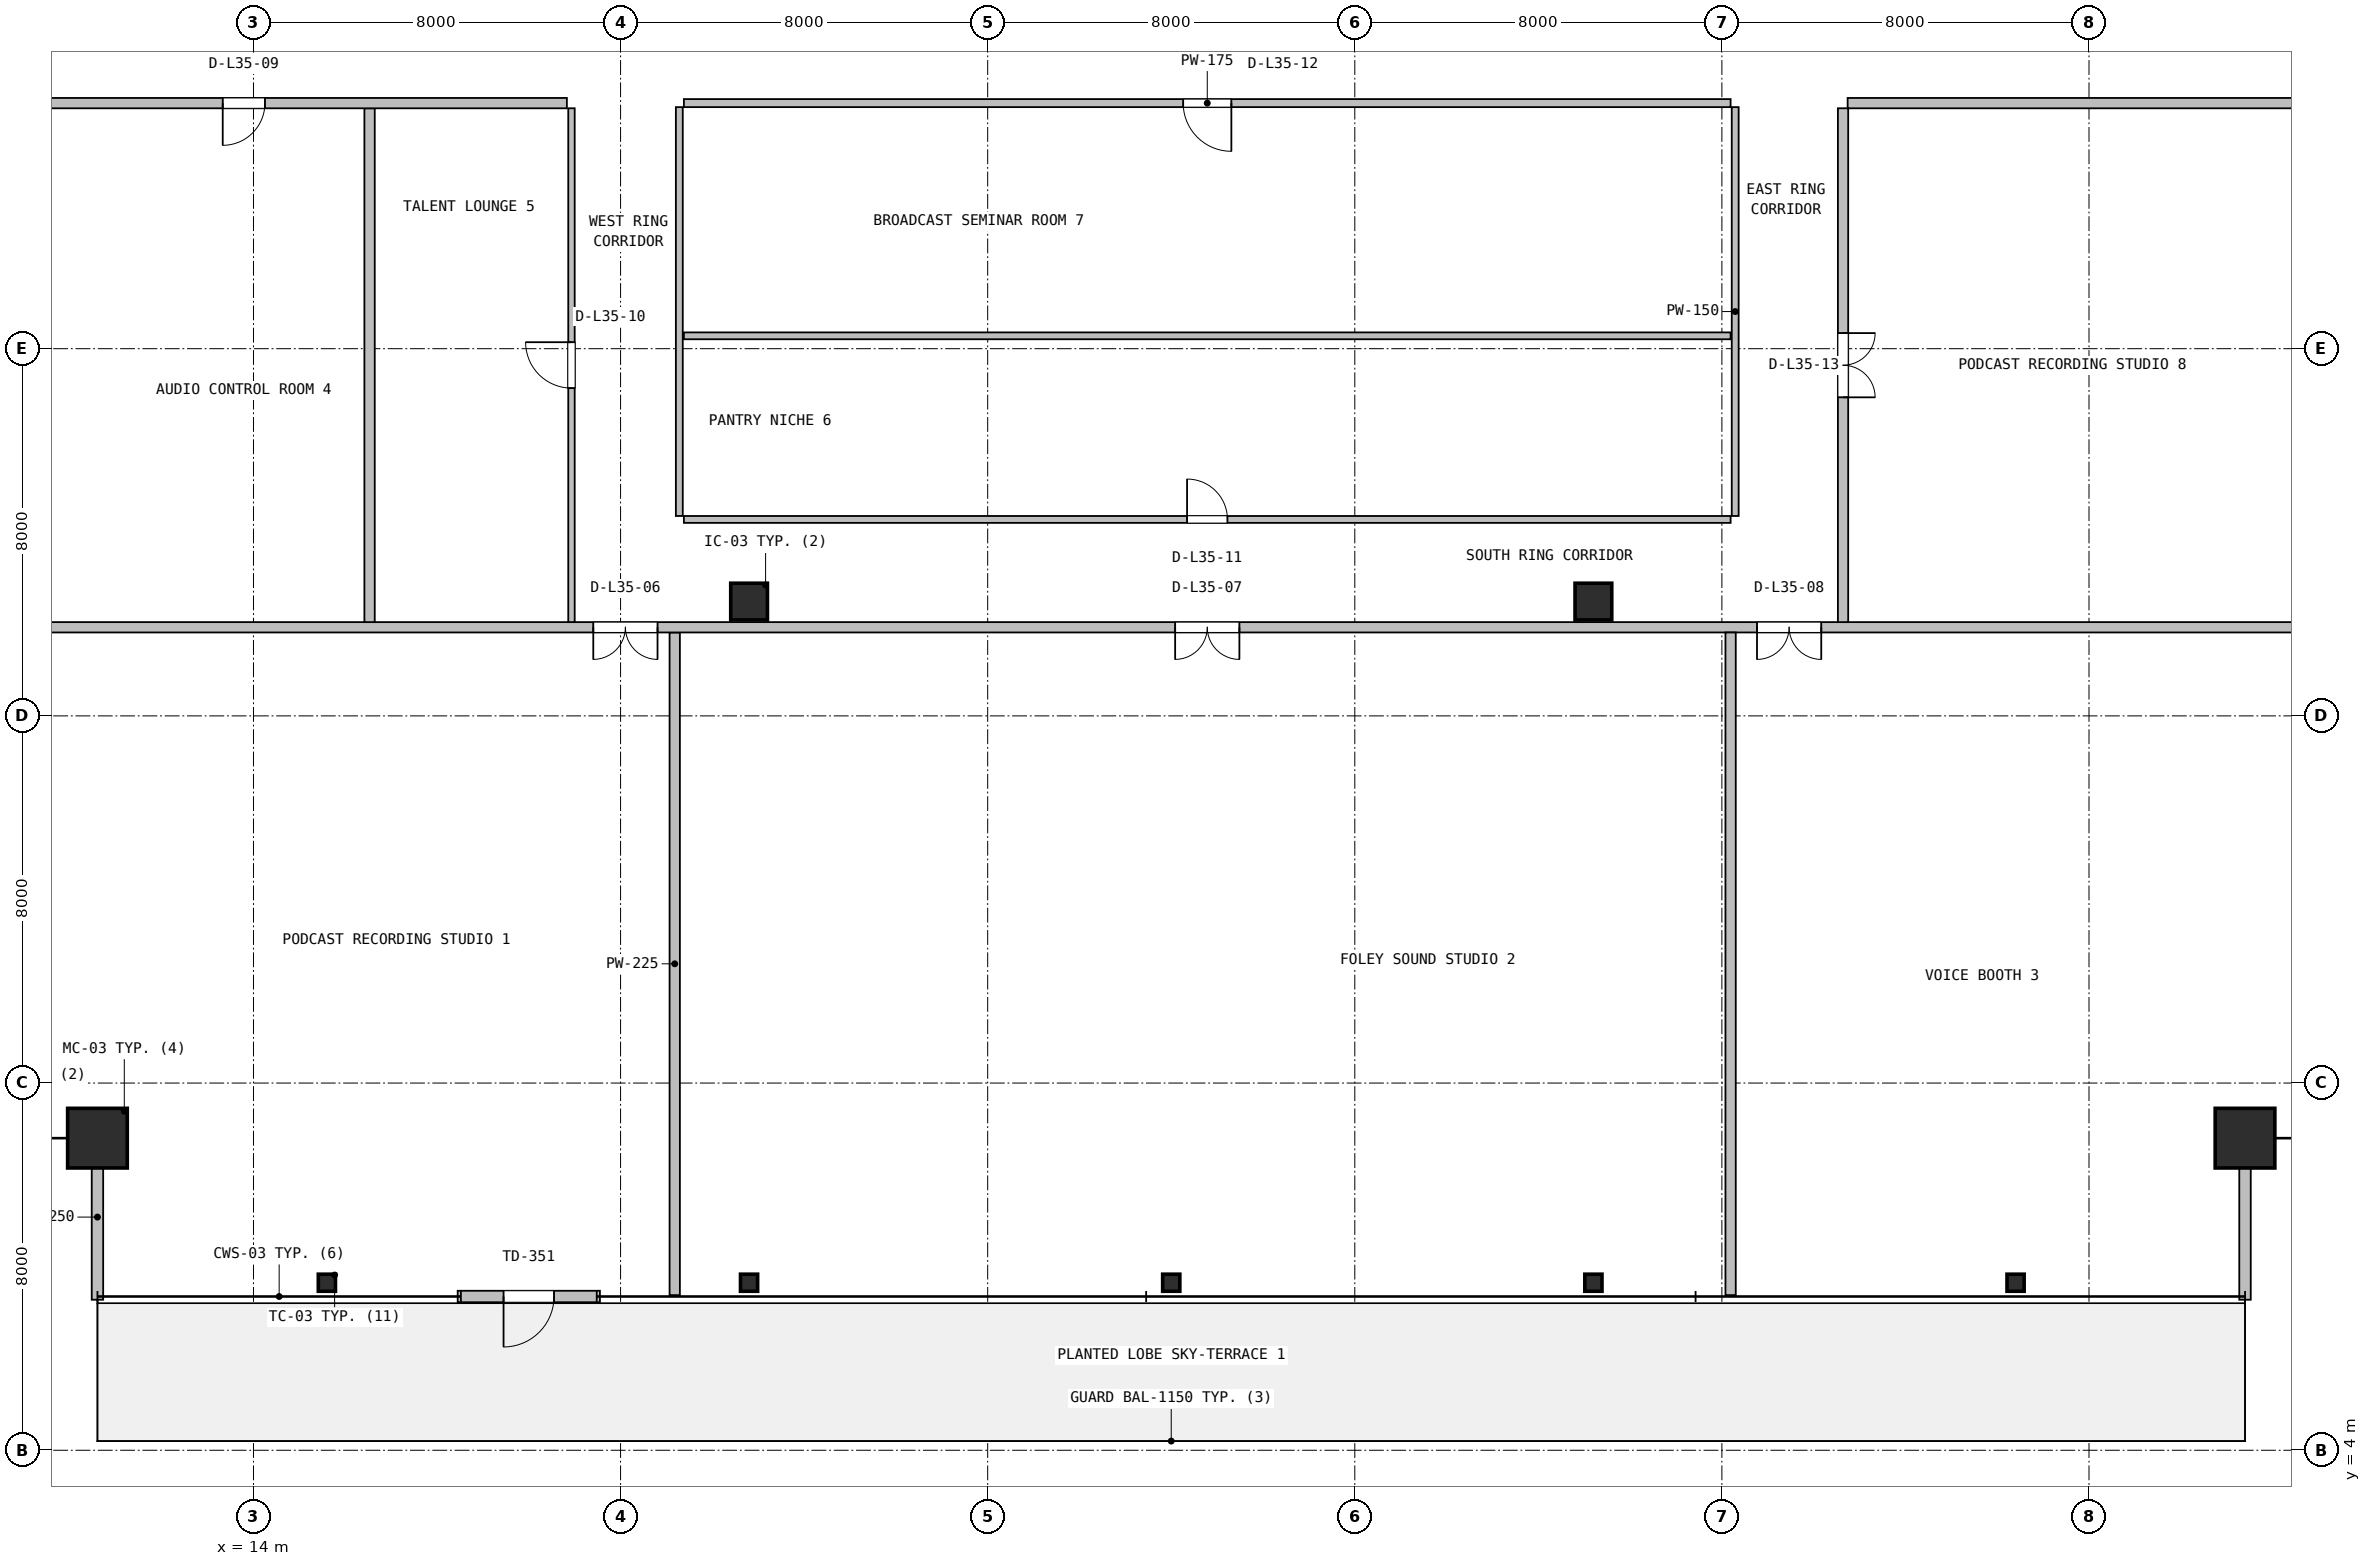
"""IFC4 building model, lengths in metres.
Left out: names, types, materials, properties, quantities, classifications, styles, units other than length and angle.
Written with IfcOpenShell. Run it as: python <this file> out.ifc"""

import sys

from ifc_helpers import new_model, si_unit, direction, frame, frame_2d, origin, origin_2d, place, context, subcontext, project, spatial, rectangle, hollow_rectangle, i_section, extrude, source, transform, mapped, element, fill, save


model = new_model("IFC4")
c1 = context("Model", 3, precision=1e-05, world=origin(), true_north=direction((0.0, 1.0)))
c2 = subcontext(c1, "Body", "Model", "MODEL_VIEW")
j1 = project(units=[si_unit("LENGTHUNIT", "METRE"), si_unit("PLANEANGLEUNIT", "RADIAN")], contexts=[c1])
p1 = place(None, origin())
s1 = spatial("IfcSite", under=j1, at=p1, CompositionType="ELEMENT")
p2 = place(p1, origin())
s2 = spatial("IfcBuilding", under=s1, at=p2, CompositionType="ELEMENT")
p3 = place(p2, frame((0.0, 0.0, 145.8)))
s3 = spatial("IfcBuildingStorey", under=s2, at=p3, CompositionType="ELEMENT", Elevation=145.8)
m1 = source(origin(), c2, "Body", "SweptSolid", [
    extrude(hollow_rectangle(XDim=1.3, YDim=1.3, WallThickness=0.05, at=origin_2d()), origin(), (0.0, 0.0, 1.0), 3.8),
])
for number, where, z_axis, x_axis in (
    (1, (10.6, 10.8, 0.0), (0.0, 0.0, 1.0), (1.0, 0.0, 0.0)),
    (2, (57.4, 10.8, 0.0), (0.0, 0.0, 1.0), (1.0, 0.0, 0.0)),
):
    element("IfcColumn", number, at=place(p3, frame(where, z_axis=z_axis, x_axis=x_axis)), inside=s3, PredefinedType="COLUMN", context=c2, shape_type="MappedRepresentation", body=[
        mapped(m1, transform((0.0, 0.0, 0.0), x_axis=(1.0, 0.0, 0.0), y_axis=(0.0, 1.0, 0.0), z_axis=(0.0, 0.0, 1.0), scale=1.0)),
    ])
m2 = source(origin(), c2, "Body", "SweptSolid", [
    extrude(i_section(OverallWidth=0.374, OverallDepth=0.372, WebThickness=0.016, FlangeThickness=0.026, FilletRadius=0.016, at=origin_2d()), origin(), (0.0, 0.0, 1.0), 3.8),
])
for number, where, z_axis, x_axis in (
    (3, (15.6, 7.65, 0.0), (0.0, 0.0, 1.0), (1.0, 0.0, 0.0)),
    (4, (24.8, 7.65, 0.0), (0.0, 0.0, 1.0), (1.0, 0.0, 0.0)),
    (5, (34.0, 7.65, 0.0), (0.0, 0.0, 1.0), (1.0, 0.0, 0.0)),
    (6, (43.2, 7.65, 0.0), (0.0, 0.0, 1.0), (1.0, 0.0, 0.0)),
    (7, (52.4, 7.65, 0.0), (0.0, 0.0, 1.0), (1.0, 0.0, 0.0)),
):
    element("IfcColumn", number, at=place(p3, frame(where, z_axis=z_axis, x_axis=x_axis)), inside=s3, PredefinedType="COLUMN", context=c2, shape_type="MappedRepresentation", body=[
        mapped(m2, transform((0.0, 0.0, 0.0), x_axis=(1.0, 0.0, 0.0), y_axis=(0.0, 1.0, 0.0), z_axis=(0.0, 0.0, 1.0), scale=1.0)),
    ])
m3 = source(origin(), c2, "Body", "SweptSolid", [
    extrude(rectangle(XDim=0.8, YDim=0.8, at=origin_2d()), origin(), (0.0, 0.0, 1.0), 3.8),
])
for number, where, z_axis, x_axis in (
    (8, (24.8, 22.49, 0.0), (0.0, 0.0, 1.0), (1.0, 0.0, 0.0)),
    (9, (43.2, 22.49, 0.0), (0.0, 0.0, 1.0), (1.0, 0.0, 0.0)),
):
    element("IfcColumn", number, at=place(p3, frame(where, z_axis=z_axis, x_axis=x_axis)), inside=s3, PredefinedType="COLUMN", context=c2, shape_type="MappedRepresentation", body=[
        mapped(m3, transform((0.0, 0.0, 0.0), x_axis=(1.0, 0.0, 0.0), y_axis=(0.0, 1.0, 0.0), z_axis=(0.0, 0.0, 1.0), scale=1.0)),
    ])
p4 = place(p3, frame((18.45, 7.35, 0.0), z_axis=(0.0, 0.0, 1.0), x_axis=(1.0, 0.0, 0.0)))
e10 = element("IfcWall", 10, at=p4, inside=s3, PredefinedType="SOLIDWALL", context=c2, shape_type="SweptSolid", body=[
    extrude(rectangle(XDim=3.1, YDim=0.25, at=frame_2d((1.55, 0.0))), origin(), (0.0, 0.0, 1.0), 3.53),
])
p5 = place(p4, frame((1.0, 0.0, 0.0)))
e11 = element("IfcOpeningElement", 11, at=p5, cuts=e10, PredefinedType="OPENING", context=c2, shape_type="SweptSolid", body=[
    extrude(rectangle(XDim=1.1, YDim=2.15, at=frame_2d((0.55, 1.075))), frame((0.0, 0.135, 0.0), z_axis=(0.0, -1.0, 0.0), x_axis=(1.0, 0.0, 0.0)), (0.0, 0.0, 1.0), 0.27),
])
for number, where, z_axis, x_axis in (
    (12, (10.6, 7.28, 0.0), (0.0, 0.0, 1.0), (0.0, 1.0, 0.0)),
    (13, (57.4, 7.28, 0.0), (0.0, 0.0, 1.0), (0.0, 1.0, 0.0)),
):
    element("IfcWall", number, at=place(p3, frame(where, z_axis=z_axis, x_axis=x_axis)), inside=s3, PredefinedType="SOLIDWALL", context=c2, shape_type="SweptSolid", body=[
        extrude(rectangle(XDim=3.6, YDim=0.25, at=frame_2d((1.8, 0.0))), origin(), (0.0, 0.0, 1.0), 3.108),
    ])
p6 = place(p3, frame((23.18, 7.38, 0.0), z_axis=(0.0, 0.0, 1.0), x_axis=(0.0, 1.0, 0.0)))
e14 = element("IfcWall", 14, at=p6, inside=s3, PredefinedType="PARTITIONING", context=c2, shape_type="SweptSolid", body=[
    extrude(rectangle(XDim=14.437, YDim=0.225, at=frame_2d((7.219, 0.0))), origin(), (0.0, 0.0, 1.0), 3.108),
])
p7 = place(p3, frame((7.18, 21.93, 0.0), z_axis=(0.0, 0.0, 1.0), x_axis=(1.0, 0.0, 0.0)))
e15 = element("IfcWall", 15, at=p7, inside=s3, PredefinedType="PARTITIONING", context=c2, shape_type="SweptSolid", body=[
    extrude(rectangle(XDim=53.64, YDim=0.225, at=frame_2d((26.82, 0.0))), origin(), (0.0, 0.0, 1.0), 2.909),
])
p8 = place(p7, frame((14.225, 0.0, 0.0)))
e16 = element("IfcOpeningElement", 16, at=p8, cuts=e15, PredefinedType="OPENING", context=c2, shape_type="SweptSolid", body=[
    extrude(rectangle(XDim=1.4, YDim=2.12, at=frame_2d((0.7, 1.06))), frame((0.0, 0.123, 0.0), z_axis=(0.0, -1.0, 0.0), x_axis=(1.0, 0.0, 0.0)), (0.0, 0.0, 1.0), 0.245),
])
p9 = place(p7, frame((26.905, 0.0, 0.0)))
e17 = element("IfcOpeningElement", 17, at=p9, cuts=e15, PredefinedType="OPENING", context=c2, shape_type="SweptSolid", body=[
    extrude(rectangle(XDim=1.4, YDim=2.12, at=frame_2d((0.7, 1.06))), frame((0.0, 0.123, 0.0), z_axis=(0.0, -1.0, 0.0), x_axis=(1.0, 0.0, 0.0)), (0.0, 0.0, 1.0), 0.245),
])
p10 = place(p7, frame((39.585, 0.0, 0.0)))
e18 = element("IfcOpeningElement", 18, at=p10, cuts=e15, PredefinedType="OPENING", context=c2, shape_type="SweptSolid", body=[
    extrude(rectangle(XDim=1.4, YDim=2.12, at=frame_2d((0.7, 1.06))), frame((0.0, 0.123, 0.0), z_axis=(0.0, -1.0, 0.0), x_axis=(1.0, 0.0, 0.0)), (0.0, 0.0, 1.0), 0.245),
])
p11 = place(p3, frame((46.19, 7.38, 0.0), z_axis=(0.0, 0.0, 1.0), x_axis=(0.0, 1.0, 0.0)))
e19 = element("IfcWall", 19, at=p11, inside=s3, PredefinedType="PARTITIONING", context=c2, shape_type="SweptSolid", body=[
    extrude(rectangle(XDim=14.437, YDim=0.225, at=frame_2d((7.219, 0.0))), origin(), (0.0, 0.0, 1.0), 3.108),
])
p12 = place(p3, frame((16.53, 22.043, 0.0), z_axis=(0.0, 0.0, 1.0), x_axis=(0.0, 1.0, 0.0)))
e20 = element("IfcWall", 20, at=p12, inside=s3, PredefinedType="PARTITIONING", context=c2, shape_type="SweptSolid", body=[
    extrude(rectangle(XDim=11.195, YDim=0.225, at=frame_2d((5.598, 0.0))), origin(), (0.0, 0.0, 1.0), 3.222),
])
p13 = place(p3, frame((7.18, 33.35, 0.0), z_axis=(0.0, 0.0, 1.0), x_axis=(1.0, 0.0, 0.0)))
e21 = element("IfcWall", 21, at=p13, inside=s3, PredefinedType="PARTITIONING", context=c2, shape_type="SweptSolid", body=[
    extrude(rectangle(XDim=13.65, YDim=0.225, at=frame_2d((6.825, 0.0))), origin(), (0.0, 0.0, 1.0), 3.108),
])
p14 = place(p13, frame((6.15, 0.0, 0.0)))
e22 = element("IfcOpeningElement", 22, at=p14, cuts=e21, PredefinedType="OPENING", context=c2, shape_type="SweptSolid", body=[
    extrude(rectangle(XDim=0.92, YDim=2.08, at=frame_2d((0.46, 1.04))), frame((0.0, 0.123, 0.0), z_axis=(0.0, -1.0, 0.0), x_axis=(1.0, 0.0, 0.0)), (0.0, 0.0, 1.0), 0.245),
])
p15 = place(p3, frame((20.93, 22.043, 0.0), z_axis=(0.0, 0.0, 1.0), x_axis=(0.0, 1.0, 0.0)))
e23 = element("IfcWall", 23, at=p15, inside=s3, PredefinedType="PARTITIONING", context=c2, shape_type="SweptSolid", body=[
    extrude(rectangle(XDim=11.195, YDim=0.14, at=frame_2d((5.598, 0.0))), origin(), (0.0, 0.0, 1.0), 3.222),
])
p16 = place(p15, frame((5.098, 0.0, 0.0)))
e24 = element("IfcOpeningElement", 24, at=p16, cuts=e23, PredefinedType="OPENING", context=c2, shape_type="SweptSolid", body=[
    extrude(rectangle(XDim=1.0, YDim=2.1, at=frame_2d((0.5, 1.05))), frame((0.0, 0.08, 0.0), z_axis=(0.0, -1.0, 0.0), x_axis=(1.0, 0.0, 0.0)), (0.0, 0.0, 1.0), 0.16),
])
p17 = place(p3, frame((23.38, 24.28, 0.0), z_axis=(0.0, 0.0, 1.0), x_axis=(1.0, 0.0, 0.0)))
e25 = element("IfcWall", 25, at=p17, inside=s3, PredefinedType="PARTITIONING", context=c2, shape_type="SweptSolid", body=[
    extrude(rectangle(XDim=22.81, YDim=0.15, at=frame_2d((11.405, 0.0))), origin(), (0.0, 0.0, 1.0), 2.909),
])
p18 = place(p17, frame((10.965, 0.0, 0.0)))
e26 = element("IfcOpeningElement", 26, at=p18, cuts=e25, PredefinedType="OPENING", context=c2, shape_type="SweptSolid", body=[
    extrude(rectangle(XDim=0.88, YDim=2.06, at=frame_2d((0.44, 1.03))), frame((0.0, 0.085, 0.0), z_axis=(0.0, -1.0, 0.0), x_axis=(1.0, 0.0, 0.0)), (0.0, 0.0, 1.0), 0.17),
])
p19 = place(p3, frame((46.29, 24.355, 0.0), z_axis=(0.0, 0.0, 1.0), x_axis=(0.0, 1.0, 0.0)))
e27 = element("IfcWall", 27, at=p19, inside=s3, PredefinedType="PARTITIONING", context=c2, shape_type="SweptSolid", body=[
    extrude(rectangle(XDim=8.908, YDim=0.15, at=frame_2d((4.454, 0.0))), origin(), (0.0, 0.0, 1.0), 3.222),
])
p20 = place(p3, frame((23.38, 28.28, 0.0), z_axis=(0.0, 0.0, 1.0), x_axis=(1.0, 0.0, 0.0)))
e28 = element("IfcWall", 28, at=p20, inside=s3, PredefinedType="PARTITIONING", context=c2, shape_type="SweptSolid", body=[
    extrude(rectangle(XDim=22.81, YDim=0.15, at=frame_2d((11.405, 0.0))), origin(), (0.0, 0.0, 1.0), 2.909),
])
p21 = place(p3, frame((23.28, 24.355, 0.0), z_axis=(0.0, 0.0, 1.0), x_axis=(0.0, 1.0, 0.0)))
e29 = element("IfcWall", 29, at=p21, inside=s3, PredefinedType="PARTITIONING", context=c2, shape_type="SweptSolid", body=[
    extrude(rectangle(XDim=8.908, YDim=0.15, at=frame_2d((4.454, 0.0))), origin(), (0.0, 0.0, 1.0), 3.222),
])
p22 = place(p3, frame((23.38, 33.35, 0.0), z_axis=(0.0, 0.0, 1.0), x_axis=(1.0, 0.0, 0.0)))
e30 = element("IfcWall", 30, at=p22, inside=s3, PredefinedType="PARTITIONING", context=c2, shape_type="SweptSolid", body=[
    extrude(rectangle(XDim=22.81, YDim=0.175, at=frame_2d((11.405, 0.0))), origin(), (0.0, 0.0, 1.0), 2.909),
])
p23 = place(p22, frame((10.88, 0.0, 0.0)))
e31 = element("IfcOpeningElement", 31, at=p23, cuts=e30, PredefinedType="OPENING", context=c2, shape_type="SweptSolid", body=[
    extrude(rectangle(XDim=1.05, YDim=2.1, at=frame_2d((0.525, 1.05))), frame((0.0, 0.098, 0.0), z_axis=(0.0, -1.0, 0.0), x_axis=(1.0, 0.0, 0.0)), (0.0, 0.0, 1.0), 0.195),
])
p24 = place(p3, frame((48.74, 33.35, 0.0), z_axis=(0.0, 0.0, 1.0), x_axis=(1.0, 0.0, 0.0)))
e32 = element("IfcWall", 32, at=p24, inside=s3, PredefinedType="PARTITIONING", context=c2, shape_type="SweptSolid", body=[
    extrude(rectangle(XDim=12.08, YDim=0.225, at=frame_2d((6.04, 0.0))), origin(), (0.0, 0.0, 1.0), 3.108),
])
p25 = place(p3, frame((48.64, 22.043, 0.0), z_axis=(0.0, 0.0, 1.0), x_axis=(0.0, 1.0, 0.0)))
e33 = element("IfcWall", 33, at=p25, inside=s3, PredefinedType="PARTITIONING", context=c2, shape_type="SweptSolid", body=[
    extrude(rectangle(XDim=11.195, YDim=0.225, at=frame_2d((5.598, 0.0))), origin(), (0.0, 0.0, 1.0), 3.222),
])
p26 = place(p25, frame((4.897, 0.0, 0.0)))
e34 = element("IfcOpeningElement", 34, at=p26, cuts=e33, PredefinedType="OPENING", context=c2, shape_type="SweptSolid", body=[
    extrude(rectangle(XDim=1.4, YDim=2.12, at=frame_2d((0.7, 1.06))), frame((0.0, 0.123, 0.0), z_axis=(0.0, -1.0, 0.0), x_axis=(1.0, 0.0, 0.0)), (0.0, 0.0, 1.0), 0.245),
])
m4 = source(origin(), c2, "Body", "SweptSolid", [
    extrude(rectangle(XDim=1.1, YDim=2.15, at=frame_2d((0.55, 1.075))), frame((0.0, 0.025, 0.0), z_axis=(0.0, -1.0, 0.0), x_axis=(1.0, 0.0, 0.0)), (0.0, 0.0, 1.0), 0.05),
])
p27 = place(p5, frame((1.1, 0.0, 0.0), z_axis=(0.0, 0.0, 1.0), x_axis=(-1.0, 0.0, 0.0)))
e35 = element("IfcDoor", 35, at=p27, inside=s3, OperationType="SINGLE_SWING_LEFT", PredefinedType="DOOR", context=c2, shape_type="MappedRepresentation", body=[
    mapped(m4, transform((0.0, 0.0, 0.0), x_axis=(1.0, 0.0, 0.0), y_axis=(0.0, 1.0, 0.0), z_axis=(0.0, 0.0, 1.0), scale=1.0)),
])
fill(e11, e35)
m5 = source(origin(), c2, "Body", "SweptSolid", [
    extrude(rectangle(XDim=1.4, YDim=2.12, at=frame_2d((0.7, 1.06))), frame((0.0, 0.025, 0.0), z_axis=(0.0, -1.0, 0.0), x_axis=(1.0, 0.0, 0.0)), (0.0, 0.0, 1.0), 0.05),
])
p28 = place(p8, frame((1.4, 0.0, 0.0), z_axis=(0.0, 0.0, 1.0), x_axis=(-1.0, 0.0, 0.0)))
e36 = element("IfcDoor", 36, at=p28, inside=s3, OperationType="DOUBLE_DOOR_SINGLE_SWING", PredefinedType="DOOR", context=c2, shape_type="MappedRepresentation", body=[
    mapped(m5, transform((0.0, 0.0, 0.0), x_axis=(1.0, 0.0, 0.0), y_axis=(0.0, 1.0, 0.0), z_axis=(0.0, 0.0, 1.0), scale=1.0)),
])
fill(e16, e36)
p29 = place(p9, frame((1.4, 0.0, 0.0), z_axis=(0.0, 0.0, 1.0), x_axis=(-1.0, 0.0, 0.0)))
e37 = element("IfcDoor", 37, at=p29, inside=s3, OperationType="DOUBLE_DOOR_SINGLE_SWING", PredefinedType="DOOR", context=c2, shape_type="MappedRepresentation", body=[
    mapped(m5, transform((0.0, 0.0, 0.0), x_axis=(1.0, 0.0, 0.0), y_axis=(0.0, 1.0, 0.0), z_axis=(0.0, 0.0, 1.0), scale=1.0)),
])
fill(e17, e37)
p30 = place(p10, frame((1.4, 0.0, 0.0), z_axis=(0.0, 0.0, 1.0), x_axis=(-1.0, 0.0, 0.0)))
e38 = element("IfcDoor", 38, at=p30, inside=s3, OperationType="DOUBLE_DOOR_SINGLE_SWING", PredefinedType="DOOR", context=c2, shape_type="MappedRepresentation", body=[
    mapped(m5, transform((0.0, 0.0, 0.0), x_axis=(1.0, 0.0, 0.0), y_axis=(0.0, 1.0, 0.0), z_axis=(0.0, 0.0, 1.0), scale=1.0)),
])
fill(e18, e38)
m6 = source(origin(), c2, "Body", "SweptSolid", [
    extrude(rectangle(XDim=0.92, YDim=2.08, at=frame_2d((0.46, 1.04))), frame((0.0, 0.025, 0.0), z_axis=(0.0, -1.0, 0.0), x_axis=(1.0, 0.0, 0.0)), (0.0, 0.0, 1.0), 0.05),
])
p31 = place(p14, frame((0.92, 0.0, 0.0), z_axis=(0.0, 0.0, 1.0), x_axis=(-1.0, 0.0, 0.0)))
e39 = element("IfcDoor", 39, at=p31, inside=s3, OperationType="SINGLE_SWING_LEFT", PredefinedType="DOOR", context=c2, shape_type="MappedRepresentation", body=[
    mapped(m6, transform((0.0, 0.0, 0.0), x_axis=(1.0, 0.0, 0.0), y_axis=(0.0, 1.0, 0.0), z_axis=(0.0, 0.0, 1.0), scale=1.0)),
])
fill(e22, e39)
m7 = source(origin(), c2, "Body", "SweptSolid", [
    extrude(rectangle(XDim=1.0, YDim=2.1, at=frame_2d((0.5, 1.05))), frame((0.0, 0.025, 0.0), z_axis=(0.0, -1.0, 0.0), x_axis=(1.0, 0.0, 0.0)), (0.0, 0.0, 1.0), 0.05),
])
p32 = place(p16, origin())
e40 = element("IfcDoor", 40, at=p32, inside=s3, OperationType="SINGLE_SWING_RIGHT", PredefinedType="DOOR", context=c2, shape_type="MappedRepresentation", body=[
    mapped(m7, transform((0.0, 0.0, 0.0), x_axis=(1.0, 0.0, 0.0), y_axis=(0.0, 1.0, 0.0), z_axis=(0.0, 0.0, 1.0), scale=1.0)),
])
fill(e24, e40)
m8 = source(origin(), c2, "Body", "SweptSolid", [
    extrude(rectangle(XDim=0.88, YDim=2.06, at=frame_2d((0.44, 1.03))), frame((0.0, 0.025, 0.0), z_axis=(0.0, -1.0, 0.0), x_axis=(1.0, 0.0, 0.0)), (0.0, 0.0, 1.0), 0.05),
])
p33 = place(p18, origin())
e41 = element("IfcDoor", 41, at=p33, inside=s3, OperationType="SINGLE_SWING_LEFT", PredefinedType="DOOR", context=c2, shape_type="MappedRepresentation", body=[
    mapped(m8, transform((0.0, 0.0, 0.0), x_axis=(1.0, 0.0, 0.0), y_axis=(0.0, 1.0, 0.0), z_axis=(0.0, 0.0, 1.0), scale=1.0)),
])
fill(e26, e41)
m9 = source(origin(), c2, "Body", "SweptSolid", [
    extrude(rectangle(XDim=1.05, YDim=2.1, at=frame_2d((0.525, 1.05))), frame((0.0, 0.025, 0.0), z_axis=(0.0, -1.0, 0.0), x_axis=(1.0, 0.0, 0.0)), (0.0, 0.0, 1.0), 0.05),
])
p34 = place(p23, frame((1.05, 0.0, 0.0), z_axis=(0.0, 0.0, 1.0), x_axis=(-1.0, 0.0, 0.0)))
e42 = element("IfcDoor", 42, at=p34, inside=s3, OperationType="SINGLE_SWING_RIGHT", PredefinedType="DOOR", context=c2, shape_type="MappedRepresentation", body=[
    mapped(m9, transform((0.0, 0.0, 0.0), x_axis=(1.0, 0.0, 0.0), y_axis=(0.0, 1.0, 0.0), z_axis=(0.0, 0.0, 1.0), scale=1.0)),
])
fill(e31, e42)
p35 = place(p26, frame((1.4, 0.0, 0.0), z_axis=(0.0, 0.0, 1.0), x_axis=(-1.0, 0.0, 0.0)))
e43 = element("IfcDoor", 43, at=p35, inside=s3, OperationType="DOUBLE_DOOR_SINGLE_SWING", PredefinedType="DOOR", context=c2, shape_type="MappedRepresentation", body=[
    mapped(m5, transform((0.0, 0.0, 0.0), x_axis=(1.0, 0.0, 0.0), y_axis=(0.0, 1.0, 0.0), z_axis=(0.0, 0.0, 1.0), scale=1.0)),
])
fill(e34, e43)
save(model, sys.argv[1])
